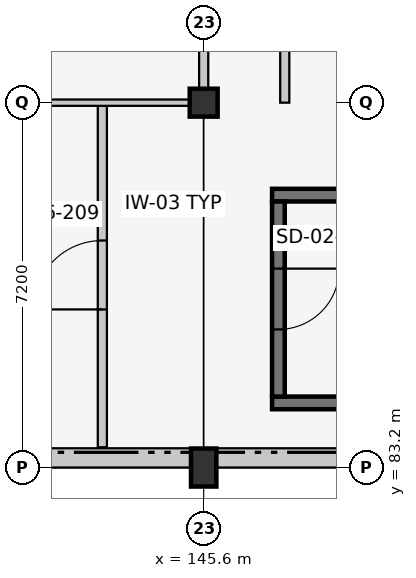
"""IFC4 building model, lengths in metres.
Left out: names, types, materials, properties, quantities, classifications, styles, units other than length and angle.
Written with IfcOpenShell. Run it as: python <this file> out.ifc"""

import sys

from ifc_helpers import new_model, si_unit, direction, frame, frame_2d, origin, origin_2d, place, context, subcontext, project, spatial, rectangle, extrude, element, fill, save


model = new_model("IFC4")
c1 = context("Model", 3, precision=1e-05, world=origin(), true_north=direction((0.0, 1.0)))
c2 = subcontext(c1, "Body", "Model", "MODEL_VIEW")
j1 = project(units=[si_unit("LENGTHUNIT", "METRE"), si_unit("PLANEANGLEUNIT", "RADIAN")], contexts=[c1])
p1 = place(None, origin())
s1 = spatial("IfcSite", under=j1, at=p1, CompositionType="ELEMENT")
p2 = place(p1, origin())
s2 = spatial("IfcBuilding", under=s1, at=p2, CompositionType="ELEMENT")
p3 = place(p2, frame((0.0, 0.0, 25.8)))
s3 = spatial("IfcBuildingStorey", under=s2, at=p3, CompositionType="ELEMENT", Elevation=25.8)
p4 = place(p3, frame((145.6, 83.2, 0.0), z_axis=(0.0, 0.0, 1.0), x_axis=(1.0, 0.0, 0.0)))
e1 = element("IfcColumn", 1, at=p4, inside=s3, PredefinedType="COLUMN", context=c2, shape_type="SweptSolid", body=[
    extrude(rectangle(XDim=0.5, YDim=0.75, at=origin_2d()), origin(), (0.0, 0.0, 1.0), 3.9),
])
p5 = place(p3, frame((145.6, 90.4, 0.0), z_axis=(0.0, 0.0, 1.0), x_axis=(1.0, 0.0, 0.0)))
e2 = element("IfcColumn", 2, at=p5, inside=s3, PredefinedType="COLUMN", context=c2, shape_type="SweptSolid", body=[
    extrude(rectangle(XDim=0.55, YDim=0.55, at=origin_2d()), origin(), (0.0, 0.0, 1.0), 3.9),
])
p6 = place(p3, frame((160.0, 83.39, 0.0), z_axis=(0.0, 0.0, 1.0), x_axis=(-1.0, 0.0, 0.0)))
e3 = element("IfcWall", 3, at=p6, inside=s3, PredefinedType="SOLIDWALL", context=c2, shape_type="SweptSolid", body=[
    extrude(rectangle(XDim=28.8, YDim=0.38, at=frame_2d((14.4, 0.0))), origin(), (0.0, 0.0, 1.0), 2.945),
])
for number, where, z_axis, x_axis in (
    (4, (146.95, 84.475, 0.0), (0.0, 0.0, 1.0), (1.0, 0.0, 0.0)),
    (5, (155.85, 88.575, 0.0), (0.0, 0.0, 1.0), (-1.0, 0.0, 0.0)),
):
    element("IfcWall", number, at=place(p3, frame(where, z_axis=z_axis, x_axis=x_axis)), inside=s3, PredefinedType="SHEAR", context=c2, shape_type="SweptSolid", body=[
        extrude(rectangle(XDim=8.9, YDim=0.25, at=frame_2d((4.45, 0.0))), origin(), (0.0, 0.0, 1.0), 3.65),
    ])
p7 = place(p3, frame((147.075, 88.45, 0.0), z_axis=(0.0, 0.0, 1.0), x_axis=(0.0, -1.0, 0.0)))
e6 = element("IfcWall", 6, at=p7, inside=s3, PredefinedType="SHEAR", context=c2, shape_type="SweptSolid", body=[
    extrude(rectangle(XDim=3.85, YDim=0.25, at=frame_2d((1.925, 0.0))), origin(), (0.0, 0.0, 1.0), 3.65),
])
p8 = place(p7, frame((1.325, 0.0, 0.0)))
e7 = element("IfcOpeningElement", 7, at=p8, cuts=e6, PredefinedType="OPENING", context=c2, shape_type="SweptSolid", body=[
    extrude(rectangle(XDim=1.2, YDim=2.15, at=frame_2d((0.6, 1.075))), frame((0.0, 0.137, 0.0), z_axis=(0.0, -1.0, 0.0), x_axis=(1.0, 0.0, 0.0)), (0.0, 0.0, 1.0), 0.274),
])
p9 = place(p3, frame((143.6, 83.6, 0.0), z_axis=(0.0, 0.0, 1.0), x_axis=(0.0, 1.0, 0.0)))
e8 = element("IfcWall", 8, at=p9, inside=s3, PredefinedType="PARTITIONING", context=c2, shape_type="SweptSolid", body=[
    extrude(rectangle(XDim=6.8, YDim=0.18, at=frame_2d((3.4, 0.0))), origin(), (0.0, 0.0, 1.0), 3.65),
])
p10 = place(p9, frame((2.72, 0.0, 0.0)))
e9 = element("IfcOpeningElement", 9, at=p10, cuts=e8, PredefinedType="OPENING", context=c2, shape_type="SweptSolid", body=[
    extrude(rectangle(XDim=1.36, YDim=2.2, at=frame_2d((0.68, 1.1))), frame((0.0, 0.102, 0.0), z_axis=(0.0, -1.0, 0.0), x_axis=(1.0, 0.0, 0.0)), (0.0, 0.0, 1.0), 0.204),
])
p11 = place(p3, frame((145.6, 90.4, 0.0), z_axis=(0.0, 0.0, 1.0), x_axis=(0.0, 1.0, 0.0)))
e10 = element("IfcWall", 10, at=p11, inside=s3, PredefinedType="PARTITIONING", context=c2, shape_type="SweptSolid", body=[
    extrude(rectangle(XDim=7.0, YDim=0.18, at=frame_2d((3.5, 0.0))), origin(), (0.0, 0.0, 1.0), 3.025),
])
p12 = place(p3, frame((147.2, 90.4, 0.0), z_axis=(0.0, 0.0, 1.0), x_axis=(0.0, 1.0, 0.0)))
e11 = element("IfcWall", 11, at=p12, inside=s3, PredefinedType="PARTITIONING", context=c2, shape_type="SweptSolid", body=[
    extrude(rectangle(XDim=7.0, YDim=0.18, at=frame_2d((3.5, 0.0))), origin(), (0.0, 0.0, 1.0), 3.65),
])
p13 = place(p3, frame((131.6, 90.4, 0.0), z_axis=(0.0, 0.0, 1.0), x_axis=(1.0, 0.0, 0.0)))
e12 = element("IfcWall", 12, at=p13, inside=s3, PredefinedType="PARTITIONING", context=c2, shape_type="SweptSolid", body=[
    extrude(rectangle(XDim=13.9, YDim=0.125, at=frame_2d((6.95, 0.0))), origin(), (0.0, 0.0, 1.0), 2.775),
])
p14 = place(p8, origin())
e13 = element("IfcDoor", 13, at=p14, inside=s3, OperationType="SINGLE_SWING_LEFT", PredefinedType="DOOR", context=c2, shape_type="SweptSolid", body=[
    extrude(rectangle(XDim=1.2, YDim=2.15, at=frame_2d((0.6, 1.075))), frame((0.0, 0.025, 0.0), z_axis=(0.0, -1.0, 0.0), x_axis=(1.0, 0.0, 0.0)), (0.0, 0.0, 1.0), 0.05),
])
fill(e7, e13)
p15 = place(p10, origin())
e14 = element("IfcDoor", 14, at=p15, inside=s3, OperationType="SINGLE_SWING_LEFT", PredefinedType="DOOR", context=c2, shape_type="SweptSolid", body=[
    extrude(rectangle(XDim=1.36, YDim=2.2, at=frame_2d((0.68, 1.1))), frame((0.0, 0.025, 0.0), z_axis=(0.0, -1.0, 0.0), x_axis=(1.0, 0.0, 0.0)), (0.0, 0.0, 1.0), 0.05),
])
fill(e9, e14)
save(model, sys.argv[1])
